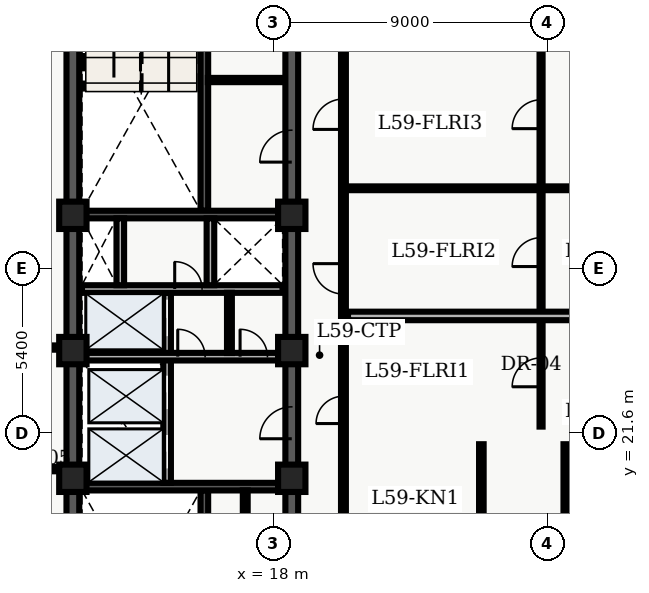
"""IFC4 building model, lengths in metres.
Left out: names, types, materials, properties, quantities, classifications, styles, units other than length and angle.
Written with IfcOpenShell. Run it as: python <this file> out.ifc"""

import sys

from ifc_helpers import new_model, entity, si_unit, converted_unit, direction, frame, origin_with_axes, origin_2d_with_axis, place, context, subcontext, project, spatial, polyline, rectangle, outline, extrude, element, fill, save


model = new_model("IFC4")
c1 = context("Model", 3, precision=1e-05, world=origin_with_axes(), true_north=direction((0.0, 1.0)))
c2 = subcontext(c1, "Body", "Model", "MODEL_VIEW")
j1 = project(units=[si_unit("LENGTHUNIT", "METRE"), converted_unit("PLANEANGLEUNIT", "DEGREE", entity("IfcPlaneAngleMeasure", 0.017), si_unit("PLANEANGLEUNIT", "RADIAN"), dimensions=[0, 0, 0, 0, 0, 0, 0])], contexts=[c1])
p1 = place(None, origin_with_axes())
s1 = spatial("IfcSite", under=j1, at=p1, CompositionType="ELEMENT")
p2 = place(p1, origin_with_axes())
s2 = spatial("IfcBuilding", under=s1, at=p2, CompositionType="ELEMENT")
p3 = place(p2, frame((0.0, 0.0, 240.3), z_axis=(0.0, 0.0, 1.0), x_axis=(1.0, 0.0, 0.0)))
s3 = spatial("IfcBuildingStorey", under=s2, at=p3, CompositionType="ELEMENT", Elevation=240.3)
p4 = place(p3, frame((11.4, 10.8, 0.0), z_axis=(0.0, 0.0, 1.0), x_axis=(0.0, 1.0, 0.0)))
e1 = element("IfcWall", 1, at=p4, inside=s3, PredefinedType="SHEAR", context=c2, shape_type="SweptSolid", body=[
    extrude(outline(polyline([(0.0, -0.21), (27.0, -0.21), (27.0, 0.21), (0.0, 0.21), (0.0, -0.21)])), origin_with_axes(), (0.0, 0.0, 1.0), 3.66),
])
p5 = place(p3, frame((18.6, 10.8, 0.0), z_axis=(0.0, 0.0, 1.0), x_axis=(0.0, 1.0, 0.0)))
e2 = element("IfcWall", 2, at=p5, inside=s3, PredefinedType="SHEAR", context=c2, shape_type="SweptSolid", body=[
    extrude(outline(polyline([(0.0, -0.21), (13.5, -0.21), (13.5, 0.21), (0.0, 0.21), (0.0, -0.21)])), origin_with_axes(), (0.0, 0.0, 1.0), 3.66),
])
p6 = place(p5, frame((1.3, 0.0, 0.0), z_axis=(0.0, 0.0, 1.0), x_axis=(1.0, 0.0, 0.0)))
e3 = element("IfcOpeningElement", 3, at=p6, cuts=e2, PredefinedType="OPENING", context=c2, shape_type="SweptSolid", body=[
    extrude(rectangle(XDim=1.1, YDim=0.44, at=origin_2d_with_axis()), origin_with_axes(), (0.0, 0.0, 1.0), 2.15),
])
p7 = place(p5, frame((3.4, 0.0, 0.0), z_axis=(0.0, 0.0, 1.0), x_axis=(1.0, 0.0, 0.0)))
e4 = element("IfcOpeningElement", 4, at=p7, cuts=e2, PredefinedType="OPENING", context=c2, shape_type="SweptSolid", body=[
    extrude(rectangle(XDim=1.1, YDim=0.44, at=origin_2d_with_axis()), origin_with_axes(), (0.0, 0.0, 1.0), 2.15),
])
p8 = place(p5, frame((11.125, 0.0, 0.0), z_axis=(0.0, 0.0, 1.0), x_axis=(1.0, 0.0, 0.0)))
e5 = element("IfcOpeningElement", 5, at=p8, cuts=e2, PredefinedType="OPENING", context=c2, shape_type="SweptSolid", body=[
    extrude(rectangle(XDim=1.05, YDim=0.44, at=origin_2d_with_axis()), origin_with_axes(), (0.0, 0.0, 1.0), 2.15),
])
p9 = place(p5, frame((6.675, 0.0, 0.0), z_axis=(0.0, 0.0, 1.0), x_axis=(1.0, 0.0, 0.0)))
e6 = element("IfcOpeningElement", 6, at=p9, cuts=e2, PredefinedType="OPENING", context=c2, shape_type="SweptSolid", body=[
    extrude(rectangle(XDim=0.95, YDim=0.44, at=origin_2d_with_axis()), origin_with_axes(), (0.0, 0.0, 1.0), 2.15),
])
p10 = place(p3, frame((18.6, 24.3, 0.0), z_axis=(0.0, 0.0, 1.0), x_axis=(0.0, 1.0, 0.0)))
e7 = element("IfcWall", 7, at=p10, inside=s3, PredefinedType="SHEAR", context=c2, shape_type="SweptSolid", body=[
    extrude(outline(polyline([(0.0, -0.21), (13.5, -0.21), (13.5, 0.21), (0.0, 0.21), (0.0, -0.21)])), origin_with_axes(), (0.0, 0.0, 1.0), 3.66),
])
p11 = place(p10, frame((6.725, 0.0, 0.0), z_axis=(0.0, 0.0, 1.0), x_axis=(1.0, 0.0, 0.0)))
e8 = element("IfcOpeningElement", 8, at=p11, cuts=e7, PredefinedType="OPENING", context=c2, shape_type="SweptSolid", body=[
    extrude(rectangle(XDim=1.05, YDim=0.44, at=origin_2d_with_axis()), origin_with_axes(), (0.0, 0.0, 1.0), 2.15),
])
p12 = place(p10, frame((11.125, 0.0, 0.0), z_axis=(0.0, 0.0, 1.0), x_axis=(1.0, 0.0, 0.0)))
e9 = element("IfcOpeningElement", 9, at=p12, cuts=e7, PredefinedType="OPENING", context=c2, shape_type="SweptSolid", body=[
    extrude(rectangle(XDim=1.05, YDim=0.44, at=origin_2d_with_axis()), origin_with_axes(), (0.0, 0.0, 1.0), 2.15),
])
p13 = place(p3, frame((15.725, 11.01, 0.0), z_axis=(0.0, 0.0, 1.0), x_axis=(0.0, 1.0, 0.0)))
e10 = element("IfcWall", 10, at=p13, inside=s3, PredefinedType="SHEAR", context=c2, shape_type="SweptSolid", body=[
    extrude(outline(polyline([(0.0, -0.125), (8.69, -0.125), (8.69, 0.125), (0.0, 0.125), (0.0, -0.125)])), origin_with_axes(), (0.0, 0.0, 1.0), 3.66),
])
p14 = place(p3, frame((11.61, 19.825, 0.0), z_axis=(0.0, 0.0, 1.0), x_axis=(1.0, 0.0, 0.0)))
e11 = element("IfcWall", 11, at=p14, inside=s3, PredefinedType="SHEAR", context=c2, shape_type="SweptSolid", body=[
    extrude(outline(polyline([(0.0, -0.125), (6.78, -0.125), (6.78, 0.125), (0.0, 0.125), (0.0, -0.125)])), origin_with_axes(), (0.0, 0.0, 1.0), 3.66),
])
p15 = place(p3, frame((15.725, 28.9, 0.0), z_axis=(0.0, 0.0, 1.0), x_axis=(0.0, 1.0, 0.0)))
e12 = element("IfcWall", 12, at=p15, inside=s3, PredefinedType="SHEAR", context=c2, shape_type="SweptSolid", body=[
    extrude(outline(polyline([(0.0, -0.125), (8.69, -0.125), (8.69, 0.125), (0.0, 0.125), (0.0, -0.125)])), origin_with_axes(), (0.0, 0.0, 1.0), 3.66),
])
p16 = place(p3, frame((11.61, 28.775, 0.0), z_axis=(0.0, 0.0, 1.0), x_axis=(1.0, 0.0, 0.0)))
e13 = element("IfcWall", 13, at=p16, inside=s3, PredefinedType="SHEAR", context=c2, shape_type="SweptSolid", body=[
    extrude(outline(polyline([(0.0, -0.125), (6.78, -0.125), (6.78, 0.125), (0.0, 0.125), (0.0, -0.125)])), origin_with_axes(), (0.0, 0.0, 1.0), 3.66),
])
p17 = place(p3, frame((14.5, 19.95, 0.0), z_axis=(0.0, 0.0, 1.0), x_axis=(0.0, 1.0, 0.0)))
e14 = element("IfcWall", 14, at=p17, inside=s3, PredefinedType="SOLIDWALL", context=c2, shape_type="SweptSolid", body=[
    extrude(outline(polyline([(0.0, -0.125), (6.25, -0.125), (6.25, 0.125), (0.0, 0.125), (0.0, -0.125)])), origin_with_axes(), (0.0, 0.0, 1.0), 2.7),
])
p18 = place(p17, frame((1.025, 0.0, 0.0), z_axis=(0.0, 0.0, 1.0), x_axis=(1.0, 0.0, 0.0)))
e15 = element("IfcOpeningElement", 15, at=p18, cuts=e14, PredefinedType="OPENING", context=c2, shape_type="SweptSolid", body=[
    extrude(rectangle(XDim=1.1, YDim=0.27, at=origin_2d_with_axis()), origin_with_axes(), (0.0, 0.0, 1.0), 2.15),
])
p19 = place(p17, frame((2.975, 0.0, 0.0), z_axis=(0.0, 0.0, 1.0), x_axis=(1.0, 0.0, 0.0)))
e16 = element("IfcOpeningElement", 16, at=p19, cuts=e14, PredefinedType="OPENING", context=c2, shape_type="SweptSolid", body=[
    extrude(rectangle(XDim=1.1, YDim=0.27, at=origin_2d_with_axis()), origin_with_axes(), (0.0, 0.0, 1.0), 2.15),
])
p20 = place(p17, frame((5.425, 0.0, 0.0), z_axis=(0.0, 0.0, 1.0), x_axis=(1.0, 0.0, 0.0)))
e17 = element("IfcOpeningElement", 17, at=p20, cuts=e14, PredefinedType="OPENING", context=c2, shape_type="SweptSolid", body=[
    extrude(rectangle(XDim=1.2, YDim=0.27, at=origin_2d_with_axis()), origin_with_axes(), (0.0, 0.0, 1.0), 2.15),
])
p21 = place(p3, frame((11.7, 24.1, 0.0), z_axis=(0.0, 0.0, 1.0), x_axis=(1.0, 0.0, 0.0)))
e18 = element("IfcWall", 18, at=p21, inside=s3, PredefinedType="SOLIDWALL", context=c2, shape_type="SweptSolid", body=[
    extrude(outline(polyline([(0.0, -0.125), (6.6, -0.125), (6.6, 0.125), (0.0, 0.125), (0.0, -0.125)])), origin_with_axes(), (0.0, 0.0, 1.0), 2.7),
])
p22 = place(p21, frame((3.6, 0.0, 0.0), z_axis=(0.0, 0.0, 1.0), x_axis=(1.0, 0.0, 0.0)))
e19 = element("IfcOpeningElement", 19, at=p22, cuts=e18, PredefinedType="OPENING", context=c2, shape_type="SweptSolid", body=[
    extrude(rectangle(XDim=0.9, YDim=0.27, at=origin_2d_with_axis()), origin_with_axes(), (0.0, 0.0, 1.0), 2.15),
])
p23 = place(p21, frame((5.65, 0.0, 0.0), z_axis=(0.0, 0.0, 1.0), x_axis=(1.0, 0.0, 0.0)))
e20 = element("IfcOpeningElement", 20, at=p23, cuts=e18, PredefinedType="OPENING", context=c2, shape_type="SweptSolid", body=[
    extrude(rectangle(XDim=0.9, YDim=0.27, at=origin_2d_with_axis()), origin_with_axes(), (0.0, 0.0, 1.0), 2.15),
])
p24 = place(p3, frame((11.7, 26.325, 0.0), z_axis=(0.0, 0.0, 1.0), x_axis=(1.0, 0.0, 0.0)))
e21 = element("IfcWall", 21, at=p24, inside=s3, PredefinedType="SOLIDWALL", context=c2, shape_type="SweptSolid", body=[
    extrude(outline(polyline([(0.0, -0.125), (6.6, -0.125), (6.6, 0.125), (0.0, 0.125), (0.0, -0.125)])), origin_with_axes(), (0.0, 0.0, 1.0), 2.7),
])
p25 = place(p24, frame((3.5, 0.0, 0.0), z_axis=(0.0, 0.0, 1.0), x_axis=(1.0, 0.0, 0.0)))
e22 = element("IfcOpeningElement", 22, at=p25, cuts=e21, PredefinedType="OPENING", context=c2, shape_type="SweptSolid", body=[
    extrude(rectangle(XDim=0.9, YDim=0.27, at=origin_2d_with_axis()), origin_with_axes(), (0.0, 0.0, 1.0), 2.15),
])
for number, where, z_axis, x_axis in (
    (23, (12.96, 26.45, 0.0), (0.0, 0.0, 1.0), (0.0, 1.0, 0.0)),
    (24, (15.925, 26.45, 0.0), (0.0, 0.0, 1.0), (0.0, 1.0, 0.0)),
):
    element("IfcWall", number, at=place(p3, frame(where, z_axis=z_axis, x_axis=x_axis)), inside=s3, PredefinedType="SOLIDWALL", context=c2, shape_type="SweptSolid", body=[
        extrude(outline(polyline([(0.0, -0.125), (2.2, -0.125), (2.2, 0.125), (0.0, 0.125), (0.0, -0.125)])), origin_with_axes(), (0.0, 0.0, 1.0), 2.7),
    ])
for number, where, z_axis, x_axis in (
    (25, (11.4, 20.1, 0.0), (0.0, 0.0, 1.0), (1.0, 0.0, 0.0)),
    (26, (11.4, 24.3, 0.0), (0.0, 0.0, 1.0), (1.0, 0.0, 0.0)),
    (27, (11.4, 28.75, 0.0), (0.0, 0.0, 1.0), (1.0, 0.0, 0.0)),
    (28, (18.6, 20.1, 0.0), (0.0, 0.0, 1.0), (1.0, 0.0, 0.0)),
    (29, (18.6, 24.3, 0.0), (0.0, 0.0, 1.0), (1.0, 0.0, 0.0)),
    (30, (18.6, 28.75, 0.0), (0.0, 0.0, 1.0), (1.0, 0.0, 0.0)),
):
    element("IfcColumn", number, at=place(p3, frame(where, z_axis=z_axis, x_axis=x_axis)), inside=s3, PredefinedType="COLUMN", context=c2, shape_type="SweptSolid", body=[
        extrude(rectangle(XDim=0.9, YDim=0.9, at=origin_2d_with_axis()), origin_with_axes(), (0.0, 0.0, 1.0), 3.9),
    ])
p26 = place(p3, frame((16.55, 24.22, 0.0), z_axis=(0.0, 0.0, 1.0), x_axis=(0.0, 1.0, 0.0)))
e31 = element("IfcWall", 31, at=p26, inside=s3, PredefinedType="PARTITIONING", context=c2, shape_type="SweptSolid", body=[
    extrude(outline(polyline([(0.0, -0.08), (1.98, -0.08), (1.98, 0.08), (0.0, 0.08), (0.0, -0.08)])), origin_with_axes(), (0.0, 0.0, 1.0), 2.7),
])
p27 = place(p3, frame((17.07, 15.34, 0.0), z_axis=(0.0, 0.0, 1.0), x_axis=(0.0, 1.0, 0.0)))
e32 = element("IfcWall", 32, at=p27, inside=s3, PredefinedType="PARTITIONING", context=c2, shape_type="SweptSolid", body=[
    extrude(outline(polyline([(0.0, -0.08), (4.36, -0.08), (4.36, 0.08), (0.0, 0.08), (0.0, -0.08)])), origin_with_axes(), (0.0, 0.0, 1.0), 2.7),
])
p28 = place(p27, frame((2.05, 0.0, 0.0), z_axis=(0.0, 0.0, 1.0), x_axis=(1.0, 0.0, 0.0)))
e33 = element("IfcOpeningElement", 33, at=p28, cuts=e32, PredefinedType="OPENING", context=c2, shape_type="SweptSolid", body=[
    extrude(rectangle(XDim=0.9, YDim=0.18, at=origin_2d_with_axis()), origin_with_axes(), (0.0, 0.0, 1.0), 2.15),
])
p29 = place(p3, frame((15.84, 33.2, 0.0), z_axis=(0.0, 0.0, 1.0), x_axis=(1.0, 0.0, 0.0)))
e34 = element("IfcWall", 34, at=p29, inside=s3, PredefinedType="PARTITIONING", context=c2, shape_type="SweptSolid", body=[
    extrude(outline(polyline([(0.0, -0.07), (2.46, -0.07), (2.46, 0.07), (0.0, 0.07), (0.0, -0.07)])), origin_with_axes(), (0.0, 0.0, 1.0), 2.7),
])
p30 = place(p3, frame((9.52, 20.4, 0.0), z_axis=(0.0, 0.0, 1.0), x_axis=(1.0, 0.0, 0.0)))
e35 = element("IfcWall", 35, at=p30, inside=s3, PredefinedType="PARTITIONING", context=c2, shape_type="SweptSolid", body=[
    extrude(outline(polyline([(0.0, -0.07), (1.58, -0.07), (1.58, 0.07), (0.0, 0.07), (0.0, -0.07)])), origin_with_axes(), (0.0, 0.0, 1.0), 2.7),
])
p31 = place(p30, frame((0.59, 0.0, 0.0), z_axis=(0.0, 0.0, 1.0), x_axis=(1.0, 0.0, 0.0)))
e36 = element("IfcOpeningElement", 36, at=p31, cuts=e35, PredefinedType="OPENING", context=c2, shape_type="SweptSolid", body=[
    extrude(rectangle(XDim=0.9, YDim=0.16, at=origin_2d_with_axis()), origin_with_axes(), (0.0, 0.0, 1.0), 2.15),
])
p32 = place(p3, frame((9.52, 24.4, 0.0), z_axis=(0.0, 0.0, 1.0), x_axis=(1.0, 0.0, 0.0)))
e37 = element("IfcWall", 37, at=p32, inside=s3, PredefinedType="PARTITIONING", context=c2, shape_type="SweptSolid", body=[
    extrude(outline(polyline([(0.0, -0.07), (1.58, -0.07), (1.58, 0.07), (0.0, 0.07), (0.0, -0.07)])), origin_with_axes(), (0.0, 0.0, 1.0), 2.7),
])
p33 = place(p3, frame((20.3, 7.8, 0.0), z_axis=(0.0, 0.0, 1.0), x_axis=(0.0, 1.0, 0.0)))
e38 = element("IfcWall", 38, at=p33, inside=s3, PredefinedType="PARTITIONING", context=c2, shape_type="SweptSolid", body=[
    extrude(outline(polyline([(0.0, -0.08), (32.7, -0.08), (32.7, 0.08), (0.0, 0.08), (0.0, -0.08)])), origin_with_axes(), (0.0, 0.0, 1.0), 2.7),
])
p34 = place(p33, frame((14.55, 0.0, 0.0), z_axis=(0.0, 0.0, 1.0), x_axis=(1.0, 0.0, 0.0)))
e39 = element("IfcOpeningElement", 39, at=p34, cuts=e38, PredefinedType="OPENING", context=c2, shape_type="SweptSolid", body=[
    extrude(rectangle(XDim=0.9, YDim=0.18, at=origin_2d_with_axis()), origin_with_axes(), (0.0, 0.0, 1.0), 2.15),
])
p35 = place(p33, frame((18.86, 0.0, 0.0), z_axis=(0.0, 0.0, 1.0), x_axis=(1.0, 0.0, 0.0)))
e40 = element("IfcOpeningElement", 40, at=p35, cuts=e38, PredefinedType="OPENING", context=c2, shape_type="SweptSolid", body=[
    extrude(rectangle(XDim=1.0, YDim=0.18, at=origin_2d_with_axis()), origin_with_axes(), (0.0, 0.0, 1.0), 2.15),
])
p36 = place(p33, frame((24.276, 0.0, 0.0), z_axis=(0.0, 0.0, 1.0), x_axis=(1.0, 0.0, 0.0)))
e41 = element("IfcOpeningElement", 41, at=p36, cuts=e38, PredefinedType="OPENING", context=c2, shape_type="SweptSolid", body=[
    extrude(rectangle(XDim=1.0, YDim=0.18, at=origin_2d_with_axis()), origin_with_axes(), (0.0, 0.0, 1.0), 2.15),
])
p37 = place(p33, frame((27.491, 0.0, 0.0), z_axis=(0.0, 0.0, 1.0), x_axis=(1.0, 0.0, 0.0)))
e42 = element("IfcOpeningElement", 42, at=p37, cuts=e38, PredefinedType="OPENING", context=c2, shape_type="SweptSolid", body=[
    extrude(rectangle(XDim=1.0, YDim=0.18, at=origin_2d_with_axis()), origin_with_axes(), (0.0, 0.0, 1.0), 2.15),
])
p38 = place(p33, frame((5.775, 0.0, 0.0), z_axis=(0.0, 0.0, 1.0), x_axis=(1.0, 0.0, 0.0)))
e43 = element("IfcOpeningElement", 43, at=p38, cuts=e38, PredefinedType="OPENING", context=c2, shape_type="SweptSolid", body=[
    extrude(rectangle(XDim=1.05, YDim=0.18, at=origin_2d_with_axis()), origin_with_axes(), (0.0, 0.0, 1.0), 2.15),
])
p39 = place(p3, frame((26.8, 21.8, 0.0), z_axis=(0.0, 0.0, 1.0), x_axis=(0.0, 1.0, 0.0)))
e44 = element("IfcWall", 44, at=p39, inside=s3, PredefinedType="PARTITIONING", context=c2, shape_type="SweptSolid", body=[
    extrude(outline(polyline([(0.0, -0.05), (18.5, -0.05), (18.5, 0.05), (0.0, 0.05), (0.0, -0.05)])), origin_with_axes(), (0.0, 0.0, 1.0), 2.7),
])
p40 = place(p39, frame((1.785, 0.0, 0.0), z_axis=(0.0, 0.0, 1.0), x_axis=(1.0, 0.0, 0.0)))
e45 = element("IfcOpeningElement", 45, at=p40, cuts=e44, PredefinedType="OPENING", context=c2, shape_type="SweptSolid", body=[
    extrude(rectangle(XDim=0.95, YDim=0.12, at=origin_2d_with_axis()), origin_with_axes(), (0.0, 0.0, 1.0), 2.15),
])
p41 = place(p39, frame((5.739, 0.0, 0.0), z_axis=(0.0, 0.0, 1.0), x_axis=(1.0, 0.0, 0.0)))
e46 = element("IfcOpeningElement", 46, at=p41, cuts=e44, PredefinedType="OPENING", context=c2, shape_type="SweptSolid", body=[
    extrude(rectangle(XDim=0.95, YDim=0.12, at=origin_2d_with_axis()), origin_with_axes(), (0.0, 0.0, 1.0), 2.15),
])
p42 = place(p39, frame((10.275, 0.0, 0.0), z_axis=(0.0, 0.0, 1.0), x_axis=(1.0, 0.0, 0.0)))
e47 = element("IfcOpeningElement", 47, at=p42, cuts=e44, PredefinedType="OPENING", context=c2, shape_type="SweptSolid", body=[
    extrude(rectangle(XDim=0.95, YDim=0.12, at=origin_2d_with_axis()), origin_with_axes(), (0.0, 0.0, 1.0), 2.15),
])
p43 = place(p39, frame((15.641, 0.0, 0.0), z_axis=(0.0, 0.0, 1.0), x_axis=(1.0, 0.0, 0.0)))
e48 = element("IfcOpeningElement", 48, at=p43, cuts=e44, PredefinedType="OPENING", context=c2, shape_type="SweptSolid", body=[
    extrude(rectangle(XDim=0.95, YDim=0.12, at=origin_2d_with_axis()), origin_with_axes(), (0.0, 0.0, 1.0), 2.15),
])
p44 = place(p3, frame((20.45, 25.44, 0.0), z_axis=(0.0, 0.0, 1.0), x_axis=(1.0, 0.0, 0.0)))
e49 = element("IfcWall", 49, at=p44, inside=s3, PredefinedType="PARTITIONING", context=c2, shape_type="SweptSolid", body=[
    extrude(outline(polyline([(0.0, -0.14), (11.615, -0.14), (11.615, 0.14), (0.0, 0.14), (0.0, -0.14)])), origin_with_axes(), (0.0, 0.0, 1.0), 2.7),
])
p45 = place(p3, frame((20.45, 29.639, 0.0), z_axis=(0.0, 0.0, 1.0), x_axis=(1.0, 0.0, 0.0)))
e50 = element("IfcWall", 50, at=p45, inside=s3, PredefinedType="PARTITIONING", context=c2, shape_type="SweptSolid", body=[
    extrude(outline(polyline([(0.0, -0.062), (11.615, -0.062), (11.615, 0.062), (0.0, 0.062), (0.0, -0.062)])), origin_with_axes(), (0.0, 0.0, 1.0), 2.7),
])
p46 = place(p3, frame((24.836, 15.02, 0.0), z_axis=(0.0, 0.0, 1.0), x_axis=(0.0, 1.0, 0.0)))
e51 = element("IfcWall", 51, at=p46, inside=s3, PredefinedType="PARTITIONING", context=c2, shape_type="SweptSolid", body=[
    extrude(outline(polyline([(0.0, -0.075), (6.2, -0.075), (6.2, 0.075), (0.0, 0.075), (0.0, -0.075)])), origin_with_axes(), (0.0, 0.0, 1.0), 2.7),
])
p47 = place(p3, frame((27.6, 15.02, 0.0), z_axis=(0.0, 0.0, 1.0), x_axis=(0.0, 1.0, 0.0)))
e52 = element("IfcWall", 52, at=p47, inside=s3, PredefinedType="PARTITIONING", context=c2, shape_type="SweptSolid", body=[
    extrude(outline(polyline([(0.0, -0.062), (6.2, -0.062), (6.2, 0.062), (0.0, 0.062), (0.0, -0.062)])), origin_with_axes(), (0.0, 0.0, 1.0), 2.7),
])
p48 = place(p17, frame((1.025, 0.0, 0.0), z_axis=(0.0, 0.0, 1.0), x_axis=(1.0, 0.0, 0.0)))
e53 = element("IfcDoor", 53, at=p48, inside=s3, OperationType="SLIDING_TO_LEFT", PredefinedType="DOOR", context=c2, shape_type="SweptSolid", body=[
    extrude(rectangle(XDim=1.1, YDim=0.09, at=origin_2d_with_axis()), origin_with_axes(), (0.0, 0.0, 1.0), 2.15),
])
fill(e15, e53)
p49 = place(p17, frame((2.975, 0.0, 0.0), z_axis=(0.0, 0.0, 1.0), x_axis=(1.0, 0.0, 0.0)))
e54 = element("IfcDoor", 54, at=p49, inside=s3, OperationType="SLIDING_TO_RIGHT", PredefinedType="DOOR", context=c2, shape_type="SweptSolid", body=[
    extrude(rectangle(XDim=1.1, YDim=0.09, at=origin_2d_with_axis()), origin_with_axes(), (0.0, 0.0, 1.0), 2.15),
])
fill(e16, e54)
p50 = place(p17, frame((5.425, 0.0, 0.0), z_axis=(0.0, 0.0, 1.0), x_axis=(1.0, 0.0, 0.0)))
e55 = element("IfcDoor", 55, at=p50, inside=s3, OperationType="DOUBLE_DOOR_SLIDING", PredefinedType="DOOR", context=c2, shape_type="SweptSolid", body=[
    extrude(rectangle(XDim=1.2, YDim=0.09, at=origin_2d_with_axis()), origin_with_axes(), (0.0, 0.0, 1.0), 2.15),
])
fill(e17, e55)
p51 = place(p5, frame((11.125, 0.0, 0.0), z_axis=(0.0, 0.0, 1.0), x_axis=(1.0, 0.0, 0.0)))
e56 = element("IfcDoor", 56, at=p51, inside=s3, OperationType="SINGLE_SWING_LEFT", PredefinedType="DOOR", context=c2, shape_type="SweptSolid", body=[
    extrude(rectangle(XDim=1.05, YDim=0.09, at=origin_2d_with_axis()), origin_with_axes(), (0.0, 0.0, 1.0), 2.15),
])
fill(e5, e56)
p52 = place(p21, frame((3.6, 0.0, 0.0), z_axis=(0.0, 0.0, 1.0), x_axis=(1.0, 0.0, 0.0)))
e57 = element("IfcDoor", 57, at=p52, inside=s3, OperationType="SINGLE_SWING_LEFT", PredefinedType="DOOR", context=c2, shape_type="SweptSolid", body=[
    extrude(rectangle(XDim=0.9, YDim=0.09, at=origin_2d_with_axis()), origin_with_axes(), (0.0, 0.0, 1.0), 2.15),
])
fill(e19, e57)
p53 = place(p21, frame((5.65, 0.0, 0.0), z_axis=(0.0, 0.0, 1.0), x_axis=(1.0, 0.0, 0.0)))
e58 = element("IfcDoor", 58, at=p53, inside=s3, OperationType="SINGLE_SWING_LEFT", PredefinedType="DOOR", context=c2, shape_type="SweptSolid", body=[
    extrude(rectangle(XDim=0.9, YDim=0.09, at=origin_2d_with_axis()), origin_with_axes(), (0.0, 0.0, 1.0), 2.15),
])
fill(e20, e58)
p54 = place(p24, frame((3.5, 0.0, 0.0), z_axis=(0.0, 0.0, 1.0), x_axis=(1.0, 0.0, 0.0)))
e59 = element("IfcDoor", 59, at=p54, inside=s3, OperationType="SINGLE_SWING_LEFT", PredefinedType="DOOR", context=c2, shape_type="SweptSolid", body=[
    extrude(rectangle(XDim=0.9, YDim=0.09, at=origin_2d_with_axis()), origin_with_axes(), (0.0, 0.0, 1.0), 2.15),
])
fill(e22, e59)
p55 = place(p10, frame((6.725, 0.0, 0.0), z_axis=(0.0, 0.0, 1.0), x_axis=(1.0, 0.0, 0.0)))
e60 = element("IfcDoor", 60, at=p55, inside=s3, OperationType="SINGLE_SWING_LEFT", PredefinedType="DOOR", context=c2, shape_type="SweptSolid", body=[
    extrude(rectangle(XDim=1.05, YDim=0.09, at=origin_2d_with_axis()), origin_with_axes(), (0.0, 0.0, 1.0), 2.15),
])
fill(e8, e60)
p56 = place(p39, frame((1.785, 0.0, 0.0), z_axis=(0.0, 0.0, 1.0), x_axis=(1.0, 0.0, 0.0)))
e61 = element("IfcDoor", 61, at=p56, inside=s3, OperationType="SINGLE_SWING_LEFT", PredefinedType="DOOR", context=c2, shape_type="SweptSolid", body=[
    extrude(rectangle(XDim=0.95, YDim=0.06, at=origin_2d_with_axis()), origin_with_axes(), (0.0, 0.0, 1.0), 2.15),
])
fill(e45, e61)
p57 = place(p33, frame((14.55, 0.0, 0.0), z_axis=(0.0, 0.0, 1.0), x_axis=(1.0, 0.0, 0.0)))
e62 = element("IfcDoor", 62, at=p57, inside=s3, OperationType="SINGLE_SWING_LEFT", PredefinedType="DOOR", context=c2, shape_type="SweptSolid", body=[
    extrude(rectangle(XDim=0.9, YDim=0.09, at=origin_2d_with_axis()), origin_with_axes(), (0.0, 0.0, 1.0), 2.15),
])
fill(e39, e62)
p58 = place(p39, frame((5.739, 0.0, 0.0), z_axis=(0.0, 0.0, 1.0), x_axis=(1.0, 0.0, 0.0)))
e63 = element("IfcDoor", 63, at=p58, inside=s3, OperationType="SINGLE_SWING_LEFT", PredefinedType="DOOR", context=c2, shape_type="SweptSolid", body=[
    extrude(rectangle(XDim=0.95, YDim=0.06, at=origin_2d_with_axis()), origin_with_axes(), (0.0, 0.0, 1.0), 2.15),
])
fill(e46, e63)
p59 = place(p33, frame((18.86, 0.0, 0.0), z_axis=(0.0, 0.0, 1.0), x_axis=(1.0, 0.0, 0.0)))
e64 = element("IfcDoor", 64, at=p59, inside=s3, OperationType="SINGLE_SWING_RIGHT", PredefinedType="DOOR", context=c2, shape_type="SweptSolid", body=[
    extrude(rectangle(XDim=1.0, YDim=0.09, at=origin_2d_with_axis()), origin_with_axes(), (0.0, 0.0, 1.0), 2.15),
])
fill(e40, e64)
p60 = place(p39, frame((10.275, 0.0, 0.0), z_axis=(0.0, 0.0, 1.0), x_axis=(1.0, 0.0, 0.0)))
e65 = element("IfcDoor", 65, at=p60, inside=s3, OperationType="SINGLE_SWING_LEFT", PredefinedType="DOOR", context=c2, shape_type="SweptSolid", body=[
    extrude(rectangle(XDim=0.95, YDim=0.06, at=origin_2d_with_axis()), origin_with_axes(), (0.0, 0.0, 1.0), 2.15),
])
fill(e47, e65)
p61 = place(p33, frame((24.276, 0.0, 0.0), z_axis=(0.0, 0.0, 1.0), x_axis=(1.0, 0.0, 0.0)))
e66 = element("IfcDoor", 66, at=p61, inside=s3, OperationType="SINGLE_SWING_LEFT", PredefinedType="DOOR", context=c2, shape_type="SweptSolid", body=[
    extrude(rectangle(XDim=1.0, YDim=0.09, at=origin_2d_with_axis()), origin_with_axes(), (0.0, 0.0, 1.0), 2.15),
])
fill(e41, e66)
save(model, sys.argv[1])
